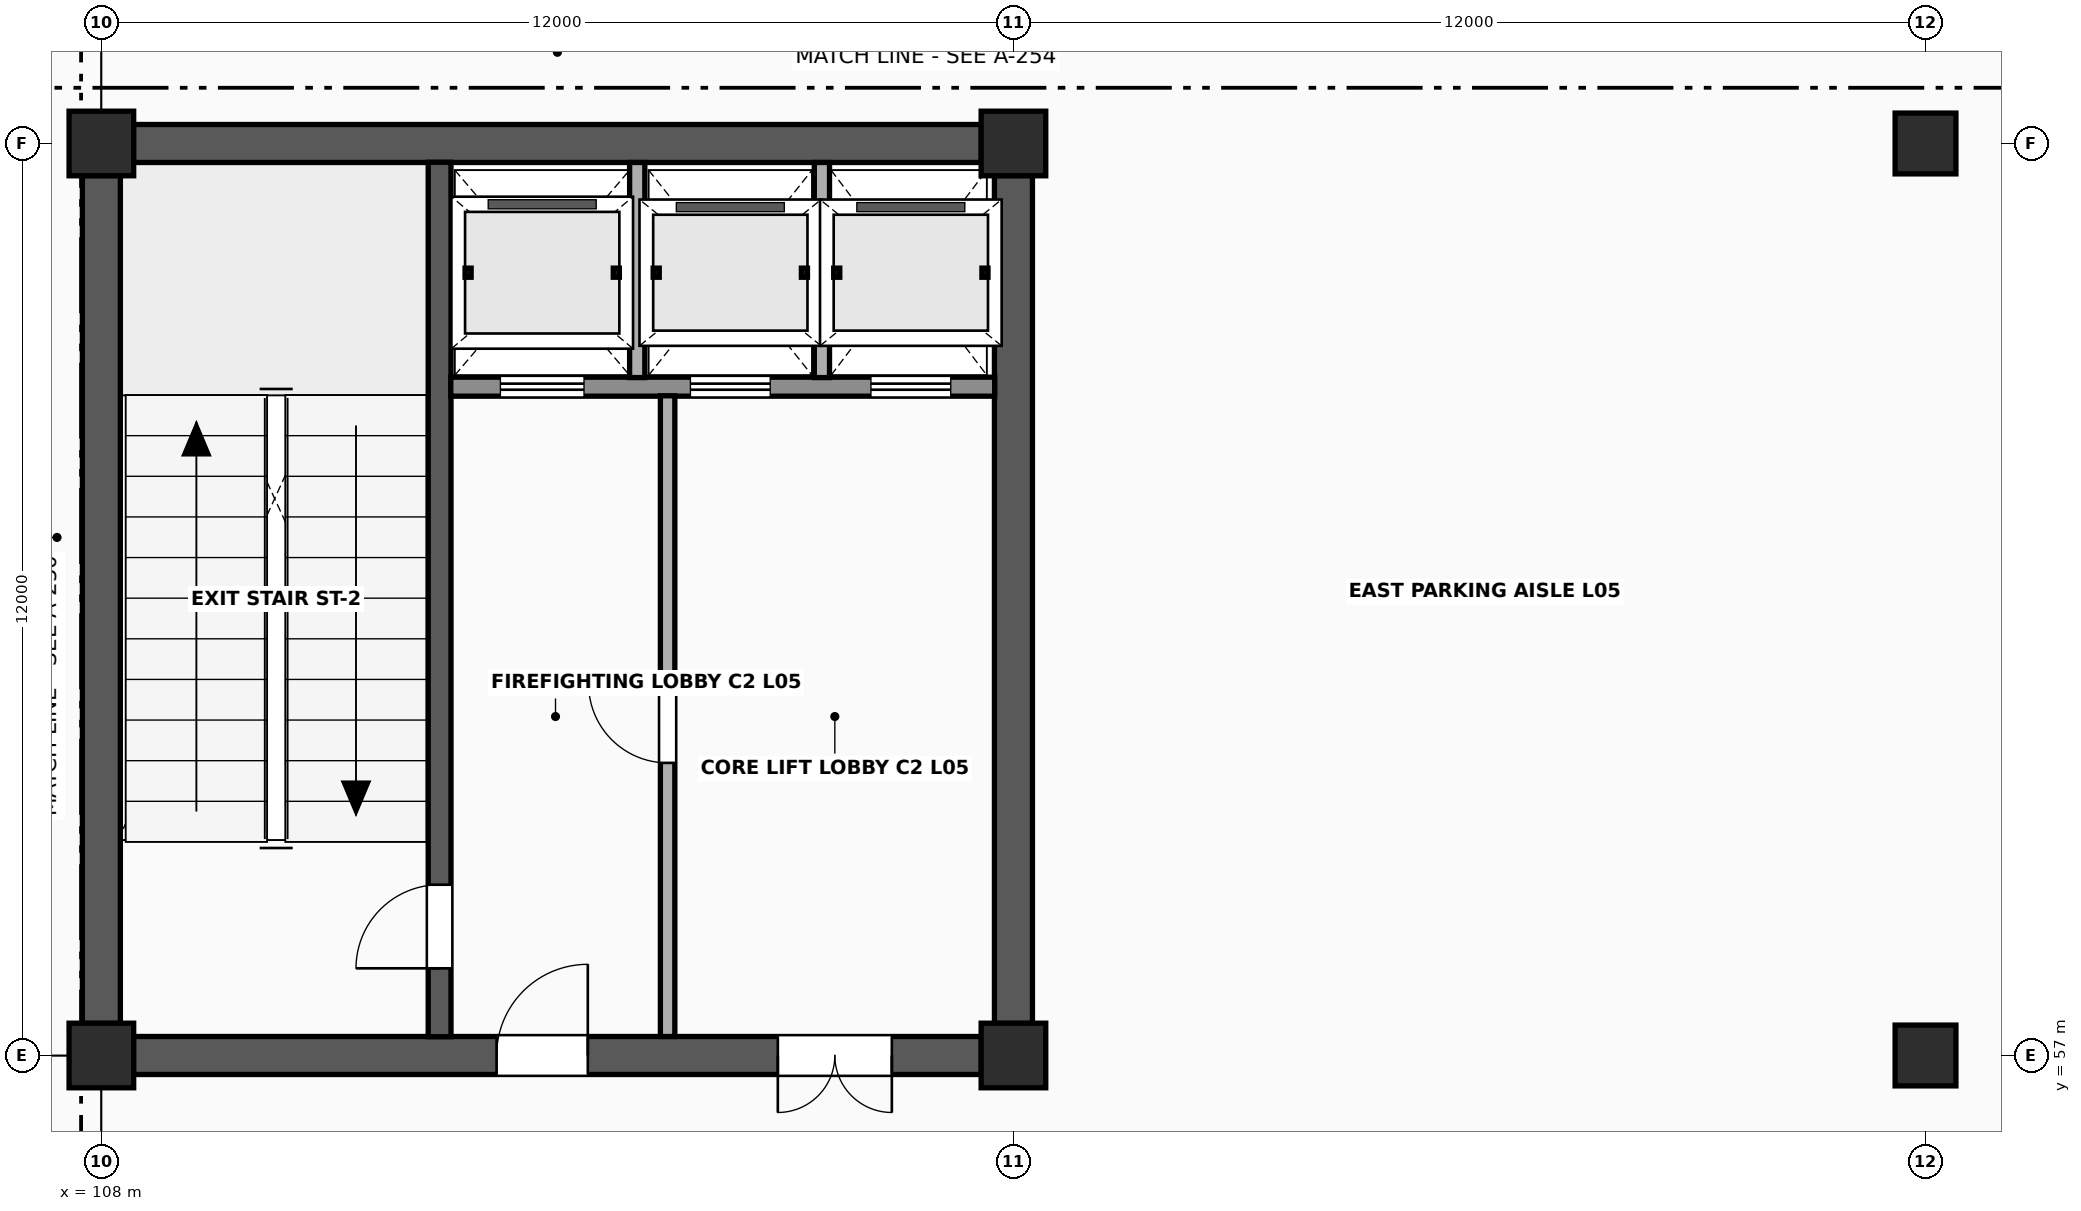
"""IFC4 building model, lengths in metres.
Left out: names, types, materials, properties, quantities, classifications, styles, units other than length and angle.
Written with IfcOpenShell. Run it as: python <this file> out.ifc"""

import sys

from ifc_helpers import new_model, si_unit, direction, frame, frame_2d, origin, origin_2d, place, context, subcontext, project, spatial, rectangle, extrude, element, fill, save


model = new_model("IFC4")
c1 = context("Model", 3, precision=1e-05, world=origin(), true_north=direction((0.0, 1.0)))
c2 = subcontext(c1, "Body", "Model", "MODEL_VIEW")
j1 = project(units=[si_unit("LENGTHUNIT", "METRE"), si_unit("PLANEANGLEUNIT", "RADIAN")], contexts=[c1])
p1 = place(None, origin())
s1 = spatial("IfcSite", under=j1, at=p1, CompositionType="ELEMENT")
p2 = place(p1, origin())
s2 = spatial("IfcBuilding", under=s1, at=p2, CompositionType="ELEMENT")
p3 = place(p2, frame((0.0, 0.0, 21.0)))
s3 = spatial("IfcBuildingStorey", under=s2, at=p3, CompositionType="ELEMENT", Elevation=21.0)
for number, where, z_axis, x_axis in (
    (1, (108.0, 57.0, 0.0), (0.0, 0.0, 1.0), (1.0, 0.0, 0.0)),
    (2, (108.0, 69.0, 0.0), (0.0, 0.0, 1.0), (1.0, 0.0, 0.0)),
    (3, (120.0, 57.0, 0.0), (0.0, 0.0, 1.0), (1.0, 0.0, 0.0)),
    (4, (120.0, 69.0, 0.0), (0.0, 0.0, 1.0), (1.0, 0.0, 0.0)),
):
    element("IfcColumn", number, at=place(p3, frame(where, z_axis=z_axis, x_axis=x_axis)), inside=s3, PredefinedType="COLUMN", context=c2, shape_type="SweptSolid", body=[
        extrude(rectangle(XDim=0.85, YDim=0.85, at=origin_2d()), origin(), (0.0, 0.0, 1.0), 3.8),
    ])
for number, where, z_axis, x_axis in (
    (5, (132.0, 57.0, 0.0), (0.0, 0.0, 1.0), (1.0, 0.0, 0.0)),
    (6, (132.0, 69.0, 0.0), (0.0, 0.0, 1.0), (1.0, 0.0, 0.0)),
):
    element("IfcColumn", number, at=place(p3, frame(where, z_axis=z_axis, x_axis=x_axis)), inside=s3, PredefinedType="COLUMN", context=c2, shape_type="SweptSolid", body=[
        extrude(rectangle(XDim=0.8, YDim=0.8, at=origin_2d()), origin(), (0.0, 0.0, 1.0), 3.8),
    ])
p4 = place(p3, frame((108.422, 57.0, 0.0), z_axis=(0.0, 0.0, 1.0), x_axis=(1.0, 0.0, 0.0)))
e7 = element("IfcWall", 7, at=p4, inside=s3, PredefinedType="SHEAR", context=c2, shape_type="SweptSolid", body=[
    extrude(rectangle(XDim=11.156, YDim=0.5, at=frame_2d((5.578, 0.0))), origin(), (0.0, 0.0, 1.0), 3.638),
])
p5 = place(p4, frame((4.778, 0.0, 0.0)))
e8 = element("IfcOpeningElement", 8, at=p5, cuts=e7, PredefinedType="OPENING", context=c2, shape_type="SweptSolid", body=[
    extrude(rectangle(XDim=1.2, YDim=2.2, at=frame_2d((0.6, 1.1))), frame((0.0, 0.265, 0.0), z_axis=(0.0, -1.0, 0.0), x_axis=(1.0, 0.0, 0.0)), (0.0, 0.0, 1.0), 0.53),
])
p6 = place(p4, frame((8.478, 0.0, 0.0)))
e9 = element("IfcOpeningElement", 9, at=p6, cuts=e7, PredefinedType="OPENING", context=c2, shape_type="SweptSolid", body=[
    extrude(rectangle(XDim=1.5, YDim=2.25, at=frame_2d((0.75, 1.125))), frame((0.0, 0.265, 0.0), z_axis=(0.0, -1.0, 0.0), x_axis=(1.0, 0.0, 0.0)), (0.0, 0.0, 1.0), 0.53),
])
for number, where, z_axis, x_axis in (
    (10, (108.422, 69.0, 0.0), (0.0, 0.0, 1.0), (1.0, 0.0, 0.0)),
    (11, (108.0, 57.422, 0.0), (0.0, 0.0, 1.0), (0.0, 1.0, 0.0)),
    (12, (120.0, 57.422, 0.0), (0.0, 0.0, 1.0), (0.0, 1.0, 0.0)),
):
    element("IfcWall", number, at=place(p3, frame(where, z_axis=z_axis, x_axis=x_axis)), inside=s3, PredefinedType="SHEAR", context=c2, shape_type="SweptSolid", body=[
        extrude(rectangle(XDim=11.156, YDim=0.5, at=frame_2d((5.578, 0.0))), origin(), (0.0, 0.0, 1.0), 3.638),
    ])
p7 = place(p3, frame((112.45, 57.247, 0.0), z_axis=(0.0, 0.0, 1.0), x_axis=(0.0, 1.0, 0.0)))
e13 = element("IfcWall", 13, at=p7, inside=s3, PredefinedType="SHEAR", context=c2, shape_type="SweptSolid", body=[
    extrude(rectangle(XDim=11.506, YDim=0.3, at=frame_2d((5.753, 0.0))), origin(), (0.0, 0.0, 1.0), 3.638),
])
p8 = place(p7, frame((0.9, 0.0, 0.0)))
e14 = element("IfcOpeningElement", 14, at=p8, cuts=e13, PredefinedType="OPENING", context=c2, shape_type="SweptSolid", body=[
    extrude(rectangle(XDim=1.1, YDim=2.2, at=frame_2d((0.55, 1.1))), frame((0.0, 0.165, 0.0), z_axis=(0.0, -1.0, 0.0), x_axis=(1.0, 0.0, 0.0)), (0.0, 0.0, 1.0), 0.33),
])
p9 = place(p3, frame((112.597, 65.8, 0.0), z_axis=(0.0, 0.0, 1.0), x_axis=(1.0, 0.0, 0.0)))
e15 = element("IfcWall", 15, at=p9, inside=s3, PredefinedType="SOLIDWALL", context=c2, shape_type="SweptSolid", body=[
    extrude(rectangle(XDim=7.156, YDim=0.25, at=frame_2d((3.578, 0.0))), origin(), (0.0, 0.0, 1.0), 3.638),
])
p10 = place(p9, frame((0.653, 0.0, 0.0)))
e16 = element("IfcOpeningElement", 16, at=p10, cuts=e15, PredefinedType="OPENING", context=c2, shape_type="SweptSolid", body=[
    extrude(rectangle(XDim=1.1, YDim=2.24, at=frame_2d((0.55, 1.12))), frame((0.0, 0.14, 0.0), z_axis=(0.0, -1.0, 0.0), x_axis=(1.0, 0.0, 0.0)), (0.0, 0.0, 1.0), 0.28),
])
p11 = place(p9, frame((3.153, 0.0, 0.0)))
e17 = element("IfcOpeningElement", 17, at=p11, cuts=e15, PredefinedType="OPENING", context=c2, shape_type="SweptSolid", body=[
    extrude(rectangle(XDim=1.05, YDim=2.2, at=frame_2d((0.525, 1.1))), frame((0.0, 0.14, 0.0), z_axis=(0.0, -1.0, 0.0), x_axis=(1.0, 0.0, 0.0)), (0.0, 0.0, 1.0), 0.28),
])
p12 = place(p9, frame((5.528, 0.0, 0.0)))
e18 = element("IfcOpeningElement", 18, at=p12, cuts=e15, PredefinedType="OPENING", context=c2, shape_type="SweptSolid", body=[
    extrude(rectangle(XDim=1.05, YDim=2.2, at=frame_2d((0.525, 1.1))), frame((0.0, 0.14, 0.0), z_axis=(0.0, -1.0, 0.0), x_axis=(1.0, 0.0, 0.0)), (0.0, 0.0, 1.0), 0.28),
])
for number, where, z_axis, x_axis in (
    (19, (115.05, 65.92, 0.0), (0.0, 0.0, 1.0), (0.0, 1.0, 0.0)),
    (20, (117.48, 65.92, 0.0), (0.0, 0.0, 1.0), (0.0, 1.0, 0.0)),
):
    element("IfcWall", number, at=place(p3, frame(where, z_axis=z_axis, x_axis=x_axis)), inside=s3, PredefinedType="SOLIDWALL", context=c2, shape_type="SweptSolid", body=[
        extrude(rectangle(XDim=2.83, YDim=0.2, at=frame_2d((1.415, 0.0))), origin(), (0.0, 0.0, 1.0), 3.628),
    ])
p13 = place(p3, frame((115.45, 57.25, 0.0), z_axis=(0.0, 0.0, 1.0), x_axis=(0.0, 1.0, 0.0)))
e21 = element("IfcWall", 21, at=p13, inside=s3, PredefinedType="SOLIDWALL", context=c2, shape_type="SweptSolid", body=[
    extrude(rectangle(XDim=8.43, YDim=0.19, at=frame_2d((4.215, 0.0))), origin(), (0.0, 0.0, 1.0), 3.628),
])
p14 = place(p13, frame((3.6, 0.0, 0.0)))
e22 = element("IfcOpeningElement", 22, at=p14, cuts=e21, PredefinedType="OPENING", context=c2, shape_type="SweptSolid", body=[
    extrude(rectangle(XDim=1.04, YDim=2.18, at=frame_2d((0.52, 1.09))), frame((0.0, 0.11, 0.0), z_axis=(0.0, -1.0, 0.0), x_axis=(1.0, 0.0, 0.0)), (0.0, 0.0, 1.0), 0.22),
])
p15 = place(p8, origin())
e23 = element("IfcDoor", 23, at=p15, inside=s3, OperationType="SINGLE_SWING_LEFT", PredefinedType="DOOR", context=c2, shape_type="SweptSolid", body=[
    extrude(rectangle(XDim=1.1, YDim=2.2, at=frame_2d((0.55, 1.1))), frame((0.0, 0.025, 0.0), z_axis=(0.0, -1.0, 0.0), x_axis=(1.0, 0.0, 0.0)), (0.0, 0.0, 1.0), 0.05),
])
fill(e14, e23)
p16 = place(p14, origin())
e24 = element("IfcDoor", 24, at=p16, inside=s3, OperationType="SINGLE_SWING_RIGHT", PredefinedType="DOOR", context=c2, shape_type="SweptSolid", body=[
    extrude(rectangle(XDim=1.04, YDim=2.18, at=frame_2d((0.52, 1.09))), frame((0.0, 0.025, 0.0), z_axis=(0.0, -1.0, 0.0), x_axis=(1.0, 0.0, 0.0)), (0.0, 0.0, 1.0), 0.05),
])
fill(e22, e24)
p17 = place(p5, origin())
e25 = element("IfcDoor", 25, at=p17, inside=s3, OperationType="SINGLE_SWING_RIGHT", PredefinedType="DOOR", context=c2, shape_type="SweptSolid", body=[
    extrude(rectangle(XDim=1.2, YDim=2.2, at=frame_2d((0.6, 1.1))), frame((0.0, 0.025, 0.0), z_axis=(0.0, -1.0, 0.0), x_axis=(1.0, 0.0, 0.0)), (0.0, 0.0, 1.0), 0.05),
])
fill(e8, e25)
p18 = place(p6, origin())
e26 = element("IfcDoor", 26, at=p18, inside=s3, OperationType="DOUBLE_DOOR_SINGLE_SWING", PredefinedType="DOOR", context=c2, shape_type="SweptSolid", body=[
    extrude(rectangle(XDim=1.5, YDim=2.25, at=frame_2d((0.75, 1.125))), frame((0.0, 0.025, 0.0), z_axis=(0.0, -1.0, 0.0), x_axis=(1.0, 0.0, 0.0)), (0.0, 0.0, 1.0), 0.05),
])
fill(e9, e26)
p19 = place(p10, origin())
e27 = element("IfcDoor", 27, at=p19, inside=s3, OperationType="SLIDING_TO_LEFT", PredefinedType="USERDEFINED", context=c2, shape_type="SweptSolid", body=[
    extrude(rectangle(XDim=1.1, YDim=2.24, at=frame_2d((0.55, 1.12))), frame((0.0, 0.025, 0.0), z_axis=(0.0, -1.0, 0.0), x_axis=(1.0, 0.0, 0.0)), (0.0, 0.0, 1.0), 0.05),
])
fill(e16, e27)
p20 = place(p11, origin())
e28 = element("IfcDoor", 28, at=p20, inside=s3, OperationType="SLIDING_TO_LEFT", PredefinedType="USERDEFINED", context=c2, shape_type="SweptSolid", body=[
    extrude(rectangle(XDim=1.05, YDim=2.2, at=frame_2d((0.525, 1.1))), frame((0.0, 0.025, 0.0), z_axis=(0.0, -1.0, 0.0), x_axis=(1.0, 0.0, 0.0)), (0.0, 0.0, 1.0), 0.05),
])
fill(e17, e28)
p21 = place(p12, origin())
e29 = element("IfcDoor", 29, at=p21, inside=s3, OperationType="SLIDING_TO_LEFT", PredefinedType="USERDEFINED", context=c2, shape_type="SweptSolid", body=[
    extrude(rectangle(XDim=1.05, YDim=2.2, at=frame_2d((0.525, 1.1))), frame((0.0, 0.025, 0.0), z_axis=(0.0, -1.0, 0.0), x_axis=(1.0, 0.0, 0.0)), (0.0, 0.0, 1.0), 0.05),
])
fill(e18, e29)
save(model, sys.argv[1])
